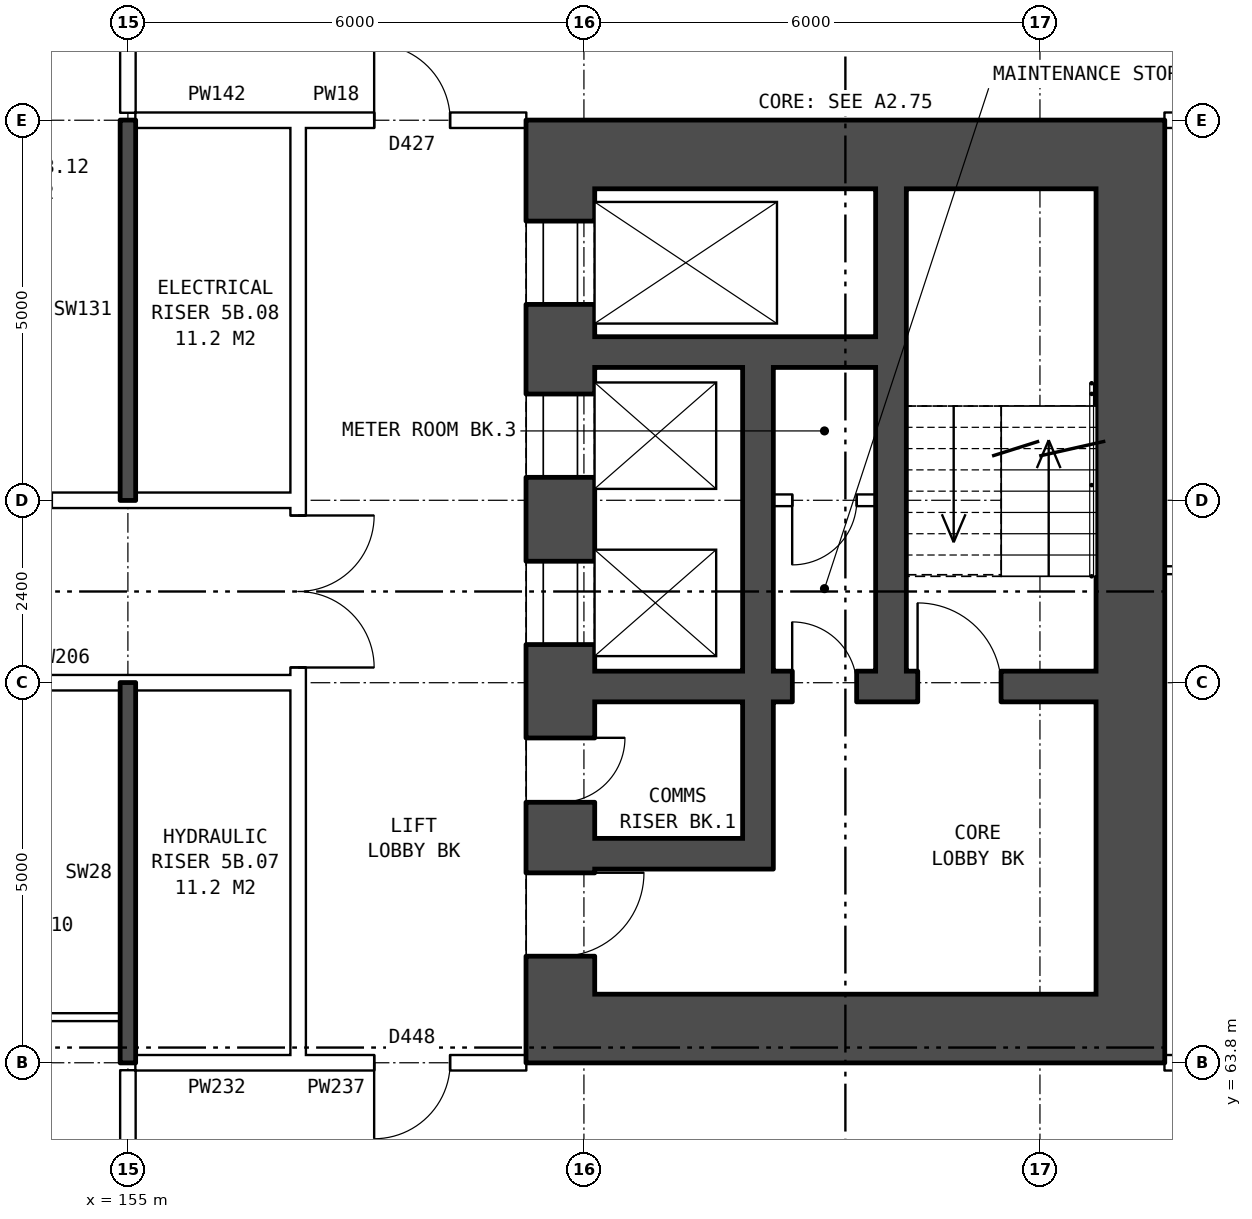
"""IFC4 building model, lengths in metres.
Left out: names, types, materials, properties, quantities, classifications, styles, units other than length and angle.
Written with IfcOpenShell. Run it as: python <this file> out.ifc"""

import sys

from ifc_helpers import new_model, si_unit, direction, frame, frame_2d, origin, place, context, subcontext, project, spatial, rectangle, extrude, element, fill, save


model = new_model("IFC4")
c1 = context("Model", 3, precision=1e-05, world=origin(), true_north=direction((0.0, 1.0)))
c2 = subcontext(c1, "Body", "Model", "MODEL_VIEW")
j1 = project(units=[si_unit("LENGTHUNIT", "METRE"), si_unit("PLANEANGLEUNIT", "RADIAN")], contexts=[c1])
p1 = place(None, origin())
s1 = spatial("IfcSite", under=j1, at=p1, CompositionType="ELEMENT")
p2 = place(p1, origin())
s2 = spatial("IfcBuilding", under=s1, at=p2, CompositionType="ELEMENT")
p3 = place(p2, frame((0.0, 0.0, 22.6)))
s3 = spatial("IfcBuildingStorey", under=s2, at=p3, CompositionType="ELEMENT", Elevation=22.6)
p4 = place(p3, frame((160.69, 75.3, 0.0), z_axis=(0.0, 0.0, 1.0), x_axis=(0.0, -1.0, 0.0)))
e1 = element("IfcWall", 1, at=p4, inside=s3, PredefinedType="SHEAR", context=c2, shape_type="SweptSolid", body=[
    extrude(rectangle(XDim=10.6, YDim=0.9, at=frame_2d((5.3, 0.0))), origin(), (0.0, 0.0, 1.0), 2.85),
])
p5 = place(p4, frame((0.425, 0.0, 0.0)))
e2 = element("IfcOpeningElement", 2, at=p5, cuts=e1, PredefinedType="OPENING", context=c2, shape_type="SweptSolid", body=[
    extrude(rectangle(XDim=1.1, YDim=2.1, at=frame_2d((0.55, 1.05))), frame((0.0, 0.46, 0.0), z_axis=(0.0, -1.0, 0.0), x_axis=(1.0, 0.0, 0.0)), (0.0, 0.0, 1.0), 0.92),
])
p6 = place(p4, frame((2.7, 0.0, 0.0)))
e3 = element("IfcOpeningElement", 3, at=p6, cuts=e1, PredefinedType="OPENING", context=c2, shape_type="SweptSolid", body=[
    extrude(rectangle(XDim=1.1, YDim=2.1, at=frame_2d((0.55, 1.05))), frame((0.0, 0.46, 0.0), z_axis=(0.0, -1.0, 0.0), x_axis=(1.0, 0.0, 0.0)), (0.0, 0.0, 1.0), 0.92),
])
p7 = place(p4, frame((4.9, 0.0, 0.0)))
e4 = element("IfcOpeningElement", 4, at=p7, cuts=e1, PredefinedType="OPENING", context=c2, shape_type="SweptSolid", body=[
    extrude(rectangle(XDim=1.1, YDim=2.1, at=frame_2d((0.55, 1.05))), frame((0.0, 0.46, 0.0), z_axis=(0.0, -1.0, 0.0), x_axis=(1.0, 0.0, 0.0)), (0.0, 0.0, 1.0), 0.92),
])
p8 = place(p4, frame((9.0, 0.0, 0.0)))
e5 = element("IfcOpeningElement", 5, at=p8, cuts=e1, PredefinedType="OPENING", context=c2, shape_type="SweptSolid", body=[
    extrude(rectangle(XDim=1.1, YDim=2.1, at=frame_2d((0.55, 1.05))), frame((0.0, 0.46, 0.0), z_axis=(0.0, -1.0, 0.0), x_axis=(1.0, 0.0, 0.0)), (0.0, 0.0, 1.0), 0.92),
])
p9 = place(p4, frame((7.225, 0.0, 0.0)))
e6 = element("IfcOpeningElement", 6, at=p9, cuts=e1, PredefinedType="OPENING", context=c2, shape_type="SweptSolid", body=[
    extrude(rectangle(XDim=0.85, YDim=2.1, at=frame_2d((0.425, 1.05))), frame((0.0, 0.46, 0.0), z_axis=(0.0, -1.0, 0.0), x_axis=(1.0, 0.0, 0.0)), (0.0, 0.0, 1.0), 0.92),
])
p10 = place(p3, frame((168.19, 75.3, 0.0), z_axis=(0.0, 0.0, 1.0), x_axis=(0.0, -1.0, 0.0)))
e7 = element("IfcWall", 7, at=p10, inside=s3, PredefinedType="SHEAR", context=c2, shape_type="SweptSolid", body=[
    extrude(rectangle(XDim=10.6, YDim=0.9, at=frame_2d((5.3, 0.0))), origin(), (0.0, 0.0, 1.0), 2.85),
])
for number, where, z_axis, x_axis in (
    (8, (160.24, 75.75, 0.0), (0.0, 0.0, 1.0), (1.0, 0.0, 0.0)),
    (9, (160.24, 64.25, 0.0), (0.0, 0.0, 1.0), (1.0, 0.0, 0.0)),
):
    element("IfcWall", number, at=place(p3, frame(where, z_axis=z_axis, x_axis=x_axis)), inside=s3, PredefinedType="SHEAR", context=c2, shape_type="SweptSolid", body=[
        extrude(rectangle(XDim=8.4, YDim=0.9, at=frame_2d((4.2, 0.0))), origin(), (0.0, 0.0, 1.0), 2.85),
    ])
p11 = place(p3, frame((161.14, 73.15, 0.0), z_axis=(0.0, 0.0, 1.0), x_axis=(1.0, 0.0, 0.0)))
e10 = element("IfcWall", 10, at=p11, inside=s3, PredefinedType="SHEAR", context=c2, shape_type="SweptSolid", body=[
    extrude(rectangle(XDim=3.7, YDim=0.4, at=frame_2d((1.85, 0.0))), origin(), (0.0, 0.0, 1.0), 2.85),
])
p12 = place(p3, frame((163.49, 71.2, 0.0), z_axis=(0.0, 0.0, 1.0), x_axis=(1.0, 0.0, 0.0)))
e11 = element("IfcWall", 11, at=p12, inside=s3, PredefinedType="PARTITIONING", context=c2, shape_type="SweptSolid", body=[
    extrude(rectangle(XDim=1.35, YDim=0.15, at=frame_2d((0.675, 0.0))), origin(), (0.0, 0.0, 1.0), 2.85),
])
p13 = place(p12, frame((0.25, 0.0, 0.0)))
e12 = element("IfcOpeningElement", 12, at=p13, cuts=e11, PredefinedType="OPENING", context=c2, shape_type="SweptSolid", body=[
    extrude(rectangle(XDim=0.85, YDim=2.1, at=frame_2d((0.425, 1.05))), frame((0.0, 0.085, 0.0), z_axis=(0.0, -1.0, 0.0), x_axis=(1.0, 0.0, 0.0)), (0.0, 0.0, 1.0), 0.17),
])
p14 = place(p3, frame((161.14, 68.75, 0.0), z_axis=(0.0, 0.0, 1.0), x_axis=(1.0, 0.0, 0.0)))
e13 = element("IfcWall", 13, at=p14, inside=s3, PredefinedType="SHEAR", context=c2, shape_type="SweptSolid", body=[
    extrude(rectangle(XDim=6.6, YDim=0.4, at=frame_2d((3.3, 0.0))), origin(), (0.0, 0.0, 1.0), 2.85),
])
p15 = place(p14, frame((4.25, 0.0, 0.0)))
e14 = element("IfcOpeningElement", 14, at=p15, cuts=e13, PredefinedType="OPENING", context=c2, shape_type="SweptSolid", body=[
    extrude(rectangle(XDim=1.1, YDim=2.1, at=frame_2d((0.55, 1.05))), frame((0.0, 0.21, 0.0), z_axis=(0.0, -1.0, 0.0), x_axis=(1.0, 0.0, 0.0)), (0.0, 0.0, 1.0), 0.42),
])
p16 = place(p14, frame((2.6, 0.0, 0.0)))
e15 = element("IfcOpeningElement", 15, at=p16, cuts=e13, PredefinedType="OPENING", context=c2, shape_type="SweptSolid", body=[
    extrude(rectangle(XDim=0.85, YDim=2.1, at=frame_2d((0.425, 1.05))), frame((0.0, 0.21, 0.0), z_axis=(0.0, -1.0, 0.0), x_axis=(1.0, 0.0, 0.0)), (0.0, 0.0, 1.0), 0.42),
])
p17 = place(p3, frame((161.14, 66.55, 0.0), z_axis=(0.0, 0.0, 1.0), x_axis=(1.0, 0.0, 0.0)))
e16 = element("IfcWall", 16, at=p17, inside=s3, PredefinedType="SHEAR", context=c2, shape_type="SweptSolid", body=[
    extrude(rectangle(XDim=1.95, YDim=0.4, at=frame_2d((0.975, 0.0))), origin(), (0.0, 0.0, 1.0), 2.85),
])
p18 = place(p3, frame((163.29, 72.95, 0.0), z_axis=(0.0, 0.0, 1.0), x_axis=(0.0, -1.0, 0.0)))
e17 = element("IfcWall", 17, at=p18, inside=s3, PredefinedType="SHEAR", context=c2, shape_type="SweptSolid", body=[
    extrude(rectangle(XDim=4.0, YDim=0.4, at=frame_2d((2.0, 0.0))), origin(), (0.0, 0.0, 1.0), 2.85),
])
p19 = place(p3, frame((163.29, 68.55, 0.0), z_axis=(0.0, 0.0, 1.0), x_axis=(0.0, -1.0, 0.0)))
e18 = element("IfcWall", 18, at=p19, inside=s3, PredefinedType="SHEAR", context=c2, shape_type="SweptSolid", body=[
    extrude(rectangle(XDim=2.2, YDim=0.4, at=frame_2d((1.1, 0.0))), origin(), (0.0, 0.0, 1.0), 2.85),
])
p20 = place(p3, frame((165.04, 75.3, 0.0), z_axis=(0.0, 0.0, 1.0), x_axis=(0.0, -1.0, 0.0)))
e19 = element("IfcWall", 19, at=p20, inside=s3, PredefinedType="SHEAR", context=c2, shape_type="SweptSolid", body=[
    extrude(rectangle(XDim=6.35, YDim=0.4, at=frame_2d((3.175, 0.0))), origin(), (0.0, 0.0, 1.0), 2.85),
])
p21 = place(p3, frame((157.24, 63.9, 0.0), z_axis=(0.0, 0.0, 1.0), x_axis=(0.0, 1.0, 0.0)))
e20 = element("IfcWall", 20, at=p21, inside=s3, PredefinedType="PARTITIONING", context=c2, shape_type="SweptSolid", body=[
    extrude(rectangle(XDim=12.2, YDim=0.2, at=frame_2d((6.1, 0.0))), origin(), (0.0, 0.0, 1.0), 2.85),
])
p22 = place(p21, frame((5.1, 0.0, 0.0)))
e21 = element("IfcOpeningElement", 21, at=p22, cuts=e20, PredefinedType="OPENING", context=c2, shape_type="SweptSolid", body=[
    extrude(rectangle(XDim=2.0, YDim=2.1, at=frame_2d((1.0, 1.05))), frame((0.0, 0.11, 0.0), z_axis=(0.0, -1.0, 0.0), x_axis=(1.0, 0.0, 0.0)), (0.0, 0.0, 1.0), 0.22),
])
p23 = place(p3, frame((155.1, 63.8, 0.0), z_axis=(0.0, 0.0, 1.0), x_axis=(1.0, 0.0, 0.0)))
e22 = element("IfcWall", 22, at=p23, inside=s3, PredefinedType="PARTITIONING", context=c2, shape_type="SweptSolid", body=[
    extrude(rectangle(XDim=2.14, YDim=0.2, at=frame_2d((1.07, 0.0))), origin(), (0.0, 0.0, 1.0), 2.85),
])
p24 = place(p3, frame((157.24, 63.8, 0.0), z_axis=(0.0, 0.0, 1.0), x_axis=(1.0, 0.0, 0.0)))
e23 = element("IfcWall", 23, at=p24, inside=s3, PredefinedType="PARTITIONING", context=c2, shape_type="SweptSolid", body=[
    extrude(rectangle(XDim=3.0, YDim=0.2, at=frame_2d((1.5, 0.0))), origin(), (0.0, 0.0, 1.0), 2.85),
])
p25 = place(p24, frame((1.0, 0.0, 0.0)))
e24 = element("IfcOpeningElement", 24, at=p25, cuts=e23, PredefinedType="OPENING", context=c2, shape_type="SweptSolid", body=[
    extrude(rectangle(XDim=1.0, YDim=2.1, at=frame_2d((0.5, 1.05))), frame((0.0, 0.11, 0.0), z_axis=(0.0, -1.0, 0.0), x_axis=(1.0, 0.0, 0.0)), (0.0, 0.0, 1.0), 0.22),
])
p26 = place(p3, frame((168.64, 63.8, 0.0), z_axis=(0.0, 0.0, 1.0), x_axis=(1.0, 0.0, 0.0)))
e25 = element("IfcWall", 25, at=p26, inside=s3, PredefinedType="PARTITIONING", context=c2, shape_type="SweptSolid", body=[
    extrude(rectangle(XDim=6.35, YDim=0.2, at=frame_2d((3.175, 0.0))), origin(), (0.0, 0.0, 1.0), 2.85),
])
p27 = place(p26, frame((1.78, 0.0, 0.0)))
e26 = element("IfcOpeningElement", 26, at=p27, cuts=e25, PredefinedType="OPENING", context=c2, shape_type="SweptSolid", body=[
    extrude(rectangle(XDim=0.8, YDim=2.1, at=frame_2d((0.4, 1.05))), frame((0.0, 0.11, 0.0), z_axis=(0.0, -1.0, 0.0), x_axis=(1.0, 0.0, 0.0)), (0.0, 0.0, 1.0), 0.22),
])
p28 = place(p3, frame((152.0, 64.4, 0.0), z_axis=(0.0, 0.0, 1.0), x_axis=(1.0, 0.0, 0.0)))
e27 = element("IfcWall", 27, at=p28, inside=s3, PredefinedType="PARTITIONING", context=c2, shape_type="SweptSolid", body=[
    extrude(rectangle(XDim=2.9, YDim=0.1, at=frame_2d((1.45, 0.0))), origin(), (0.0, 0.0, 1.0), 2.85),
])
p29 = place(p3, frame((142.76, 68.8, 0.0), z_axis=(0.0, 0.0, 1.0), x_axis=(1.0, 0.0, 0.0)))
e28 = element("IfcWall", 28, at=p29, inside=s3, PredefinedType="PARTITIONING", context=c2, shape_type="SweptSolid", body=[
    extrude(rectangle(XDim=14.48, YDim=0.2, at=frame_2d((7.24, 0.0))), origin(), (0.0, 0.0, 1.0), 2.85),
])
p30 = place(p29, frame((4.24, 0.0, 0.0)))
e29 = element("IfcOpeningElement", 29, at=p30, cuts=e28, PredefinedType="OPENING", context=c2, shape_type="SweptSolid", body=[
    extrude(rectangle(XDim=1.0, YDim=2.1, at=frame_2d((0.5, 1.05))), frame((0.0, 0.11, 0.0), z_axis=(0.0, -1.0, 0.0), x_axis=(1.0, 0.0, 0.0)), (0.0, 0.0, 1.0), 0.22),
])
p31 = place(p29, frame((7.24, 0.0, 0.0)))
e30 = element("IfcOpeningElement", 30, at=p31, cuts=e28, PredefinedType="OPENING", context=c2, shape_type="SweptSolid", body=[
    extrude(rectangle(XDim=1.0, YDim=2.1, at=frame_2d((0.5, 1.05))), frame((0.0, 0.11, 0.0), z_axis=(0.0, -1.0, 0.0), x_axis=(1.0, 0.0, 0.0)), (0.0, 0.0, 1.0), 0.22),
])
p32 = place(p3, frame((168.64, 70.28, 0.0), z_axis=(0.0, 0.0, 1.0), x_axis=(1.0, 0.0, 0.0)))
e31 = element("IfcWall", 31, at=p32, inside=s3, PredefinedType="PARTITIONING", context=c2, shape_type="SweptSolid", body=[
    extrude(rectangle(XDim=4.26, YDim=0.1, at=frame_2d((2.13, 0.0))), origin(), (0.0, 0.0, 1.0), 2.85),
])
p33 = place(p3, frame((142.76, 71.2, 0.0), z_axis=(0.0, 0.0, 1.0), x_axis=(1.0, 0.0, 0.0)))
e32 = element("IfcWall", 32, at=p33, inside=s3, PredefinedType="PARTITIONING", context=c2, shape_type="SweptSolid", body=[
    extrude(rectangle(XDim=14.48, YDim=0.2, at=frame_2d((7.24, 0.0))), origin(), (0.0, 0.0, 1.0), 2.85),
])
p34 = place(p33, frame((4.24, 0.0, 0.0)))
e33 = element("IfcOpeningElement", 33, at=p34, cuts=e32, PredefinedType="OPENING", context=c2, shape_type="SweptSolid", body=[
    extrude(rectangle(XDim=1.0, YDim=2.1, at=frame_2d((0.5, 1.05))), frame((0.0, 0.11, 0.0), z_axis=(0.0, -1.0, 0.0), x_axis=(1.0, 0.0, 0.0)), (0.0, 0.0, 1.0), 0.22),
])
p35 = place(p33, frame((10.24, 0.0, 0.0)))
e34 = element("IfcOpeningElement", 34, at=p35, cuts=e32, PredefinedType="OPENING", context=c2, shape_type="SweptSolid", body=[
    extrude(rectangle(XDim=1.0, YDim=2.1, at=frame_2d((0.5, 1.05))), frame((0.0, 0.11, 0.0), z_axis=(0.0, -1.0, 0.0), x_axis=(1.0, 0.0, 0.0)), (0.0, 0.0, 1.0), 0.22),
])
p36 = place(p3, frame((155.1, 76.2, 0.0), z_axis=(0.0, 0.0, 1.0), x_axis=(1.0, 0.0, 0.0)))
e35 = element("IfcWall", 35, at=p36, inside=s3, PredefinedType="PARTITIONING", context=c2, shape_type="SweptSolid", body=[
    extrude(rectangle(XDim=2.14, YDim=0.2, at=frame_2d((1.07, 0.0))), origin(), (0.0, 0.0, 1.0), 2.85),
])
p37 = place(p3, frame((157.24, 76.2, 0.0), z_axis=(0.0, 0.0, 1.0), x_axis=(1.0, 0.0, 0.0)))
e36 = element("IfcWall", 36, at=p37, inside=s3, PredefinedType="PARTITIONING", context=c2, shape_type="SweptSolid", body=[
    extrude(rectangle(XDim=3.0, YDim=0.2, at=frame_2d((1.5, 0.0))), origin(), (0.0, 0.0, 1.0), 2.85),
])
p38 = place(p37, frame((1.0, 0.0, 0.0)))
e37 = element("IfcOpeningElement", 37, at=p38, cuts=e36, PredefinedType="OPENING", context=c2, shape_type="SweptSolid", body=[
    extrude(rectangle(XDim=1.0, YDim=2.1, at=frame_2d((0.5, 1.05))), frame((0.0, 0.11, 0.0), z_axis=(0.0, -1.0, 0.0), x_axis=(1.0, 0.0, 0.0)), (0.0, 0.0, 1.0), 0.22),
])
p39 = place(p3, frame((168.64, 76.2, 0.0), z_axis=(0.0, 0.0, 1.0), x_axis=(1.0, 0.0, 0.0)))
e38 = element("IfcWall", 38, at=p39, inside=s3, PredefinedType="PARTITIONING", context=c2, shape_type="SweptSolid", body=[
    extrude(rectangle(XDim=6.35, YDim=0.2, at=frame_2d((3.175, 0.0))), origin(), (0.0, 0.0, 1.0), 2.85),
])
p40 = place(p39, frame((1.78, 0.0, 0.0)))
e39 = element("IfcOpeningElement", 39, at=p40, cuts=e38, PredefinedType="OPENING", context=c2, shape_type="SweptSolid", body=[
    extrude(rectangle(XDim=0.8, YDim=2.1, at=frame_2d((0.4, 1.05))), frame((0.0, 0.11, 0.0), z_axis=(0.0, -1.0, 0.0), x_axis=(1.0, 0.0, 0.0)), (0.0, 0.0, 1.0), 0.22),
])
p41 = place(p3, frame((155.0, 61.5, 0.0), z_axis=(0.0, 0.0, 1.0), x_axis=(0.0, 1.0, 0.0)))
e40 = element("IfcWall", 40, at=p41, inside=s3, PredefinedType="PARTITIONING", context=c2, shape_type="SweptSolid", body=[
    extrude(rectangle(XDim=2.2, YDim=0.2, at=frame_2d((1.1, 0.0))), origin(), (0.0, 0.0, 1.0), 2.85),
])
for number, where, z_axis, x_axis in (
    (41, (155.0, 63.8, 0.0), (0.0, 0.0, 1.0), (0.0, 1.0, 0.0)),
    (42, (155.0, 71.2, 0.0), (0.0, 0.0, 1.0), (0.0, 1.0, 0.0)),
):
    element("IfcWall", number, at=place(p3, frame(where, z_axis=z_axis, x_axis=x_axis)), inside=s3, PredefinedType="SOLIDWALL", context=c2, shape_type="SweptSolid", body=[
        extrude(rectangle(XDim=5.0, YDim=0.2, at=frame_2d((2.5, 0.0))), origin(), (0.0, 0.0, 1.0), 2.85),
    ])
p42 = place(p3, frame((155.0, 76.3, 0.0), z_axis=(0.0, 0.0, 1.0), x_axis=(0.0, 1.0, 0.0)))
e43 = element("IfcWall", 43, at=p42, inside=s3, PredefinedType="PARTITIONING", context=c2, shape_type="SweptSolid", body=[
    extrude(rectangle(XDim=2.2, YDim=0.2, at=frame_2d((1.1, 0.0))), origin(), (0.0, 0.0, 1.0), 2.85),
])
p43 = place(p5, origin())
e44 = element("IfcDoor", 44, at=p43, inside=s3, OperationType="DOUBLE_DOOR_SLIDING", PredefinedType="DOOR", context=c2, shape_type="SweptSolid", body=[
    extrude(rectangle(XDim=1.1, YDim=2.1, at=frame_2d((0.55, 1.05))), frame((0.0, 0.435, 0.0), z_axis=(0.0, -1.0, 0.0), x_axis=(1.0, 0.0, 0.0)), (0.0, 0.0, 1.0), 0.05),
])
fill(e2, e44)
p44 = place(p6, origin())
e45 = element("IfcDoor", 45, at=p44, inside=s3, OperationType="DOUBLE_DOOR_SLIDING", PredefinedType="DOOR", context=c2, shape_type="SweptSolid", body=[
    extrude(rectangle(XDim=1.1, YDim=2.1, at=frame_2d((0.55, 1.05))), frame((0.0, 0.435, 0.0), z_axis=(0.0, -1.0, 0.0), x_axis=(1.0, 0.0, 0.0)), (0.0, 0.0, 1.0), 0.05),
])
fill(e3, e45)
p45 = place(p7, origin())
e46 = element("IfcDoor", 46, at=p45, inside=s3, OperationType="DOUBLE_DOOR_SLIDING", PredefinedType="DOOR", context=c2, shape_type="SweptSolid", body=[
    extrude(rectangle(XDim=1.1, YDim=2.1, at=frame_2d((0.55, 1.05))), frame((0.0, 0.435, 0.0), z_axis=(0.0, -1.0, 0.0), x_axis=(1.0, 0.0, 0.0)), (0.0, 0.0, 1.0), 0.05),
])
fill(e4, e46)
p46 = place(p8, origin())
e47 = element("IfcDoor", 47, at=p46, inside=s3, OperationType="SINGLE_SWING_LEFT", PredefinedType="DOOR", context=c2, shape_type="SweptSolid", body=[
    extrude(rectangle(XDim=1.1, YDim=2.1, at=frame_2d((0.55, 1.05))), frame((0.0, 0.435, 0.0), z_axis=(0.0, -1.0, 0.0), x_axis=(1.0, 0.0, 0.0)), (0.0, 0.0, 1.0), 0.05),
])
fill(e5, e47)
p47 = place(p15, origin())
e48 = element("IfcDoor", 48, at=p47, inside=s3, OperationType="SINGLE_SWING_LEFT", PredefinedType="DOOR", context=c2, shape_type="SweptSolid", body=[
    extrude(rectangle(XDim=1.1, YDim=2.1, at=frame_2d((0.55, 1.05))), frame((0.0, 0.025, 0.0), z_axis=(0.0, -1.0, 0.0), x_axis=(1.0, 0.0, 0.0)), (0.0, 0.0, 1.0), 0.05),
])
fill(e14, e48)
p48 = place(p9, origin())
e49 = element("IfcDoor", 49, at=p48, inside=s3, OperationType="SINGLE_SWING_LEFT", PredefinedType="DOOR", context=c2, shape_type="SweptSolid", body=[
    extrude(rectangle(XDim=0.85, YDim=2.1, at=frame_2d((0.425, 1.05))), frame((0.0, 0.435, 0.0), z_axis=(0.0, -1.0, 0.0), x_axis=(1.0, 0.0, 0.0)), (0.0, 0.0, 1.0), 0.05),
])
fill(e6, e49)
p49 = place(p16, origin())
e50 = element("IfcDoor", 50, at=p49, inside=s3, OperationType="SINGLE_SWING_LEFT", PredefinedType="DOOR", context=c2, shape_type="SweptSolid", body=[
    extrude(rectangle(XDim=0.85, YDim=2.1, at=frame_2d((0.425, 1.05))), frame((0.0, 0.025, 0.0), z_axis=(0.0, -1.0, 0.0), x_axis=(1.0, 0.0, 0.0)), (0.0, 0.0, 1.0), 0.05),
])
fill(e15, e50)
p50 = place(p13, frame((0.85, 0.0, 0.0), z_axis=(0.0, 0.0, 1.0), x_axis=(-1.0, 0.0, 0.0)))
e51 = element("IfcDoor", 51, at=p50, inside=s3, OperationType="SINGLE_SWING_RIGHT", PredefinedType="DOOR", context=c2, shape_type="SweptSolid", body=[
    extrude(rectangle(XDim=0.85, YDim=2.1, at=frame_2d((0.425, 1.05))), frame((0.0, 0.025, 0.0), z_axis=(0.0, -1.0, 0.0), x_axis=(1.0, 0.0, 0.0)), (0.0, 0.0, 1.0), 0.05),
])
fill(e12, e51)
p51 = place(p22, frame((2.0, 0.0, 0.0), z_axis=(0.0, 0.0, 1.0), x_axis=(-1.0, 0.0, 0.0)))
e52 = element("IfcDoor", 52, at=p51, inside=s3, OperationType="DOUBLE_DOOR_SINGLE_SWING", PredefinedType="DOOR", context=c2, shape_type="SweptSolid", body=[
    extrude(rectangle(XDim=2.0, YDim=2.1, at=frame_2d((1.0, 1.05))), frame((0.0, 0.025, 0.0), z_axis=(0.0, -1.0, 0.0), x_axis=(1.0, 0.0, 0.0)), (0.0, 0.0, 1.0), 0.05),
])
fill(e21, e52)
p52 = place(p25, frame((1.0, 0.0, 0.0), z_axis=(0.0, 0.0, 1.0), x_axis=(-1.0, 0.0, 0.0)))
e53 = element("IfcDoor", 53, at=p52, inside=s3, OperationType="SINGLE_SWING_RIGHT", PredefinedType="DOOR", context=c2, shape_type="SweptSolid", body=[
    extrude(rectangle(XDim=1.0, YDim=2.1, at=frame_2d((0.5, 1.05))), frame((0.0, 0.025, 0.0), z_axis=(0.0, -1.0, 0.0), x_axis=(1.0, 0.0, 0.0)), (0.0, 0.0, 1.0), 0.05),
])
fill(e24, e53)
p53 = place(p38, origin())
e54 = element("IfcDoor", 54, at=p53, inside=s3, OperationType="SINGLE_SWING_LEFT", PredefinedType="DOOR", context=c2, shape_type="SweptSolid", body=[
    extrude(rectangle(XDim=1.0, YDim=2.1, at=frame_2d((0.5, 1.05))), frame((0.0, 0.025, 0.0), z_axis=(0.0, -1.0, 0.0), x_axis=(1.0, 0.0, 0.0)), (0.0, 0.0, 1.0), 0.05),
])
fill(e37, e54)
save(model, sys.argv[1])
